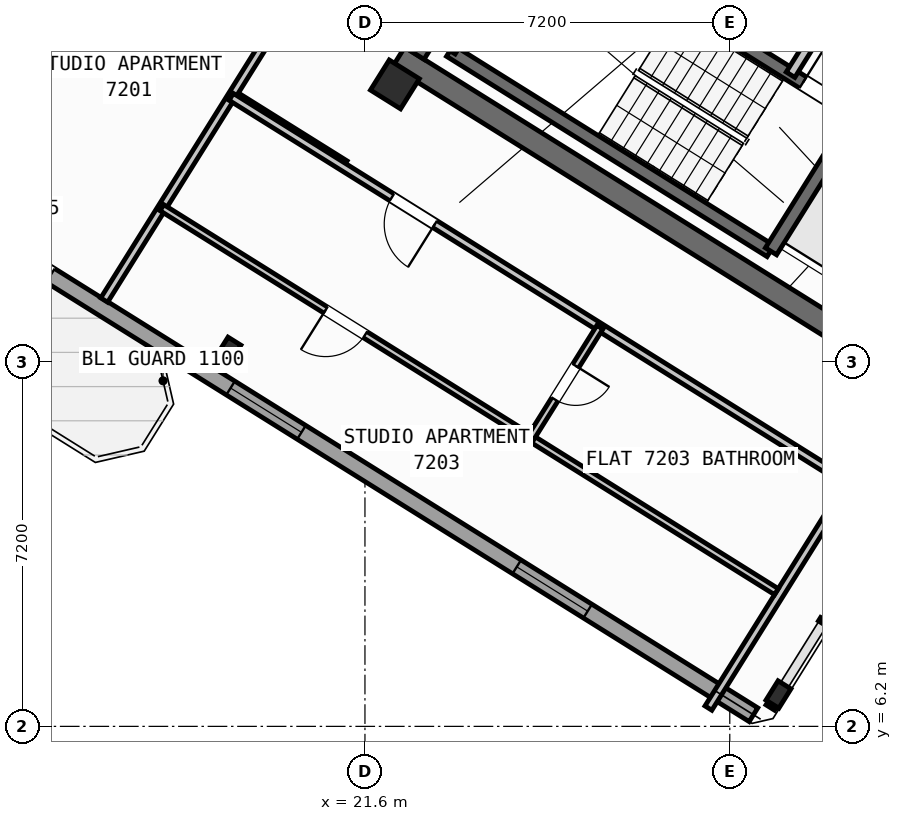
"""IFC4 building model, lengths in metres.
Left out: names, types, materials, properties, quantities, classifications, styles, units other than length and angle.
Written with IfcOpenShell. Run it as: python <this file> out.ifc"""

import sys

from ifc_helpers import new_model, si_unit, direction, frame, frame_2d, origin, origin_2d, place, context, subcontext, project, spatial, rectangle, hollow_rectangle, i_section, extrude, source, transform, mapped, element, fill, save


model = new_model("IFC4")
c1 = context("Model", 3, precision=1e-05, world=origin(), true_north=direction((0.0, 1.0)))
c2 = subcontext(c1, "Body", "Model", "MODEL_VIEW")
j1 = project(units=[si_unit("LENGTHUNIT", "METRE"), si_unit("PLANEANGLEUNIT", "RADIAN")], contexts=[c1])
p1 = place(None, origin())
s1 = spatial("IfcSite", under=j1, at=p1, CompositionType="ELEMENT")
p2 = place(p1, origin())
s2 = spatial("IfcBuilding", under=s1, at=p2, CompositionType="ELEMENT")
p3 = place(p2, frame((0.0, 0.0, 284.4)))
s3 = spatial("IfcBuildingStorey", under=s2, at=p3, CompositionType="ELEMENT", Elevation=284.4)
p4 = place(p3, frame((33.324, 12.503, 0.0), z_axis=(0.0, 0.0, 1.0), x_axis=(-0.848043529849, 0.529926571782, 0.0)))
e1 = element("IfcWall", 1, at=p4, inside=s3, PredefinedType="SHEAR", context=c2, shape_type="SweptSolid", body=[
    extrude(rectangle(XDim=13.04, YDim=0.45, at=frame_2d((6.52, 0.0))), origin(), (0.0, 0.0, 1.0), 3.35),
])
p5 = place(p3, frame((26.007, 24.976, 0.0), z_axis=(0.0, 0.0, 1.0), x_axis=(-0.529931155655, -0.848040665456, 0.0)))
e2 = element("IfcWall", 2, at=p5, inside=s3, PredefinedType="SHEAR", context=c2, shape_type="SweptSolid", body=[
    extrude(rectangle(XDim=6.475, YDim=0.45, at=frame_2d((3.238, 0.0))), origin(), (0.0, 0.0, 1.0), 3.35),
])
m1 = source(origin(), c2, "Body", "SweptSolid", [
    extrude(i_section(OverallWidth=0.3, OverallDepth=0.45, WebThickness=0.014, FlangeThickness=0.026, at=origin_2d()), origin(), (0.0, 0.0, 1.0), 3.6),
])
p6 = place(p3, frame((29.761, 6.829, 0.0), z_axis=(0.0, 0.0, 1.0), x_axis=(-0.848048096156, 0.529919264233, 0.0)))
e3 = element("IfcColumn", 3, at=p6, inside=s3, PredefinedType="COLUMN", context=c2, shape_type="MappedRepresentation", body=[
    mapped(m1, transform((0.0, 0.0, 0.0), scale=1.0)),
])
m2 = source(origin(), c2, "Body", "SweptSolid", [
    extrude(hollow_rectangle(XDim=0.7, YDim=0.7, WallThickness=0.028, at=origin_2d()), origin(), (0.0, 0.0, 1.0), 3.6),
])
p7 = place(p3, frame((22.191, 18.87, 0.0), z_axis=(0.0, 0.0, 1.0), x_axis=(-0.848048096156, 0.529919264233, 0.0)))
e4 = element("IfcColumn", 4, at=p7, inside=s3, PredefinedType="COLUMN", context=c2, shape_type="MappedRepresentation", body=[
    mapped(m2, transform((0.0, 0.0, 0.0), scale=1.0)),
])
p8 = place(p3, frame((18.906, 13.612, 0.0), z_axis=(0.0, 0.0, 1.0), x_axis=(-0.848048096156, 0.529919264233, 0.0)))
e5 = element("IfcColumn", 5, at=p8, inside=s3, PredefinedType="COLUMN", context=c2, shape_type="MappedRepresentation", body=[
    mapped(m1, transform((0.0, 0.0, 0.0), scale=1.0)),
])
p9 = place(p3, frame((29.268, 6.429, 0.0), z_axis=(0.0, 0.0, 1.0), x_axis=(-0.848048398186, 0.529918780885, 0.0)))
e6 = element("IfcWall", 6, at=p9, inside=s3, PredefinedType="STANDARD", context=c2, shape_type="SweptSolid", body=[
    extrude(rectangle(XDim=25.188, YDim=0.32, at=frame_2d((12.594, 0.0))), origin(), (0.0, 0.0, 1.0), 3.35),
])
p10 = place(p9, frame((16.362, 0.0, 0.0)))
e7 = element("IfcOpeningElement", 7, at=p10, cuts=e6, PredefinedType="OPENING", context=c2, shape_type="SweptSolid", body=[
    extrude(rectangle(XDim=1.2, YDim=2.15, at=frame_2d((0.6, 1.075))), frame((0.0, 0.17, 0.0), z_axis=(0.0, -1.0, 0.0), x_axis=(1.0, 0.0, 0.0)), (0.0, 0.0, 1.0), 0.34),
])
p11 = place(p9, frame((3.859, 0.0, 0.9)))
e8 = element("IfcOpeningElement", 8, at=p11, cuts=e6, PredefinedType="OPENING", context=c2, shape_type="SweptSolid", body=[
    extrude(rectangle(XDim=1.65, YDim=1.45, at=frame_2d((0.825, 0.725))), frame((0.0, 0.17, 0.0), z_axis=(0.0, -1.0, 0.0), x_axis=(1.0, 0.0, 0.0)), (0.0, 0.0, 1.0), 0.34),
])
p12 = place(p9, frame((10.519, 0.0, 0.9)))
e9 = element("IfcOpeningElement", 9, at=p12, cuts=e6, PredefinedType="OPENING", context=c2, shape_type="SweptSolid", body=[
    extrude(rectangle(XDim=1.65, YDim=1.45, at=frame_2d((0.825, 0.725))), frame((0.0, 0.17, 0.0), z_axis=(0.0, -1.0, 0.0), x_axis=(1.0, 0.0, 0.0)), (0.0, 0.0, 1.0), 0.34),
])
p13 = place(p9, frame((19.841, 0.0, 0.95)))
e10 = element("IfcOpeningElement", 10, at=p13, cuts=e6, PredefinedType="OPENING", context=c2, shape_type="SweptSolid", body=[
    extrude(rectangle(XDim=1.95, YDim=1.35, at=frame_2d((0.975, 0.675))), frame((0.0, 0.17, 0.0), z_axis=(0.0, -1.0, 0.0), x_axis=(1.0, 0.0, 0.0)), (0.0, 0.0, 1.0), 0.34),
])
p14 = place(p9, frame((23.478, 0.0, 1.0)))
e11 = element("IfcOpeningElement", 11, at=p14, cuts=e6, PredefinedType="OPENING", context=c2, shape_type="SweptSolid", body=[
    extrude(rectangle(XDim=0.9, YDim=1.25, at=frame_2d((0.45, 0.625))), frame((0.0, 0.17, 0.0), z_axis=(0.0, -1.0, 0.0), x_axis=(1.0, 0.0, 0.0)), (0.0, 0.0, 1.0), 0.34),
])
p15 = place(p3, frame((29.605, 15.581, 0.0), z_axis=(0.0, 0.0, 1.0), x_axis=(-0.848036911448, 0.529937163087, 0.0)))
e12 = element("IfcWall", 12, at=p15, inside=s3, PredefinedType="SHEAR", context=c2, shape_type="SweptSolid", body=[
    extrude(rectangle(XDim=7.46, YDim=0.26, at=frame_2d((3.73, 0.0))), origin(), (0.0, 0.0, 1.0), 3.35),
])
p16 = place(p3, frame((31.28, 18.261, 0.0), z_axis=(0.0, 0.0, 1.0), x_axis=(-0.848051618787, 0.529913626805, 0.0)))
e13 = element("IfcWall", 13, at=p16, inside=s3, PredefinedType="SHEAR", context=c2, shape_type="SweptSolid", body=[
    extrude(rectangle(XDim=7.46, YDim=0.26, at=frame_2d((3.73, 0.0))), origin(), (0.0, 0.0, 1.0), 3.35),
])
p17 = place(p16, frame((0.36, 0.0, 0.0)))
e14 = element("IfcOpeningElement", 14, at=p17, cuts=e13, PredefinedType="OPENING", context=c2, shape_type="SweptSolid", body=[
    extrude(rectangle(XDim=0.86, YDim=2.05, at=frame_2d((0.43, 1.025))), frame((0.0, 0.14, 0.0), z_axis=(0.0, -1.0, 0.0), x_axis=(1.0, 0.0, 0.0)), (0.0, 0.0, 1.0), 0.28),
])
p18 = place(p3, frame((31.288, 18.256, 0.0), z_axis=(0.0, 0.0, 1.0), x_axis=(-0.529943379326, -0.848033026897, 0.0)))
e15 = element("IfcWall", 15, at=p18, inside=s3, PredefinedType="SHEAR", context=c2, shape_type="SweptSolid", body=[
    extrude(rectangle(XDim=3.16, YDim=0.26, at=frame_2d((1.58, 0.0))), origin(), (0.0, 0.0, 1.0), 3.35),
])
p19 = place(p3, frame((24.945, 22.22, 0.0), z_axis=(0.0, 0.0, 1.0), x_axis=(-0.529908658664, -0.84805472316, 0.0)))
e16 = element("IfcWall", 16, at=p19, inside=s3, PredefinedType="SHEAR", context=c2, shape_type="SweptSolid", body=[
    extrude(rectangle(XDim=3.16, YDim=0.26, at=frame_2d((1.58, 0.0))), origin(), (0.0, 0.0, 1.0), 3.35),
])
p20 = place(p3, frame((31.525, 21.504, 0.0), z_axis=(0.0, 0.0, 1.0), x_axis=(-0.529907497854, -0.848055448493, 0.0)))
e17 = element("IfcWall", 17, at=p20, inside=s3, PredefinedType="STANDARD", context=c2, shape_type="SweptSolid", body=[
    extrude(rectangle(XDim=2.88, YDim=0.2, at=frame_2d((1.44, 0.0))), origin(), (0.0, 0.0, 1.0), 3.34),
])
p21 = place(p3, frame((21.206, 17.292, 0.0), z_axis=(0.0, 0.0, 1.0), x_axis=(-0.848050851465, 0.529914854792, 0.0)))
e18 = element("IfcWall", 18, at=p21, inside=s3, PredefinedType="PARTITIONING", context=c2, shape_type="SweptSolid", body=[
    extrude(rectangle(XDim=2.61, YDim=0.16, at=frame_2d((1.305, 0.0))), origin(), (0.0, 0.0, 1.0), 3.34),
])
p22 = place(p3, frame((25.807, 29.582, 0.0), z_axis=(0.0, 0.0, 1.0), x_axis=(-0.529918119251, -0.84804881162, 0.0)))
e19 = element("IfcWall", 19, at=p22, inside=s3, PredefinedType="PARTITIONING", context=c2, shape_type="SweptSolid", body=[
    extrude(rectangle(XDim=17.65, YDim=0.16, at=frame_2d((8.825, 0.0))), origin(), (0.0, 0.0, 1.0), 3.34),
])
p23 = place(p3, frame((16.572, 21.954, 0.0), z_axis=(0.0, 0.0, 1.0), x_axis=(-0.529904903214, -0.848057069748, 0.0)))
e20 = element("IfcWall", 20, at=p23, inside=s3, PredefinedType="PARTITIONING", context=c2, shape_type="SweptSolid", body=[
    extrude(rectangle(XDim=5.601, YDim=0.16, at=frame_2d((2.801, 0.0))), origin(), (0.0, 0.0, 1.0), 2.875),
])
p24 = place(p3, frame((19.523, 33.508, 0.0), z_axis=(0.0, 0.0, 1.0), x_axis=(-0.529910765222, -0.848053406869, 0.0)))
e21 = element("IfcWall", 21, at=p24, inside=s3, PredefinedType="PARTITIONING", context=c2, shape_type="SweptSolid", body=[
    extrude(rectangle(XDim=17.92, YDim=0.11, at=frame_2d((8.96, 0.0))), origin(), (0.0, 0.0, 1.0), 3.34),
])
p25 = place(p24, frame((0.76, 0.0, 0.0)))
e22 = element("IfcOpeningElement", 22, at=p25, cuts=e21, PredefinedType="OPENING", context=c2, shape_type="SweptSolid", body=[
    extrude(rectangle(XDim=0.78, YDim=2.05, at=frame_2d((0.39, 1.025))), frame((0.0, 0.065, 0.0), z_axis=(0.0, -1.0, 0.0), x_axis=(1.0, 0.0, 0.0)), (0.0, 0.0, 1.0), 0.13),
])
p26 = place(p24, frame((6.289, 0.0, 0.0)))
e23 = element("IfcOpeningElement", 23, at=p26, cuts=e21, PredefinedType="OPENING", context=c2, shape_type="SweptSolid", body=[
    extrude(rectangle(XDim=0.92, YDim=2.08, at=frame_2d((0.46, 1.04))), frame((0.0, 0.065, 0.0), z_axis=(0.0, -1.0, 0.0), x_axis=(1.0, 0.0, 0.0)), (0.0, 0.0, 1.0), 0.13),
])
p27 = place(p3, frame((32.164, 10.374, 0.0), z_axis=(0.0, 0.0, 1.0), x_axis=(-0.848044107957, 0.529925646633, 0.0)))
e24 = element("IfcWall", 24, at=p27, inside=s3, PredefinedType="PARTITIONING", context=c2, shape_type="SweptSolid", body=[
    extrude(rectangle(XDim=15.57, YDim=0.16, at=frame_2d((7.785, 0.0))), origin(), (0.0, 0.0, 1.0), 3.34),
])
p28 = place(p27, frame((10.83, 0.0, 0.0)))
e25 = element("IfcOpeningElement", 25, at=p28, cuts=e24, PredefinedType="OPENING", context=c2, shape_type="SweptSolid", body=[
    extrude(rectangle(XDim=1.0, YDim=2.1, at=frame_2d((0.5, 1.05))), frame((0.0, 0.09, 0.0), z_axis=(0.0, -1.0, 0.0), x_axis=(1.0, 0.0, 0.0)), (0.0, 0.0, 1.0), 0.18),
])
p29 = place(p3, frame((31.282, 11.208, 0.0), z_axis=(0.0, 0.0, 1.0), x_axis=(-0.529938869374, -0.84803584519, 0.0)))
e26 = element("IfcWall", 26, at=p29, inside=s3, PredefinedType="PARTITIONING", context=c2, shape_type="SweptSolid", body=[
    extrude(rectangle(XDim=5.48, YDim=0.16, at=frame_2d((2.74, 0.0))), origin(), (0.0, 0.0, 1.0), 3.34),
])
p30 = place(p3, frame((29.72, 8.859, 0.0), z_axis=(0.0, 0.0, 1.0), x_axis=(-0.848049134363, 0.529917602752, 0.0)))
e27 = element("IfcWall", 27, at=p30, inside=s3, PredefinedType="PLUMBINGWALL", context=c2, shape_type="SweptSolid", body=[
    extrude(rectangle(XDim=14.3, YDim=0.14, at=frame_2d((7.15, 0.0))), origin(), (0.0, 0.0, 1.0), 3.34),
])
p31 = place(p30, frame((9.57, 0.0, 0.0)))
e28 = element("IfcOpeningElement", 28, at=p31, cuts=e27, PredefinedType="OPENING", context=c2, shape_type="SweptSolid", body=[
    extrude(rectangle(XDim=0.92, YDim=2.08, at=frame_2d((0.46, 1.04))), frame((0.0, 0.08, 0.0), z_axis=(0.0, -1.0, 0.0), x_axis=(1.0, 0.0, 0.0)), (0.0, 0.0, 1.0), 0.16),
])
p32 = place(p3, frame((26.237, 14.078, 0.0), z_axis=(0.0, 0.0, 1.0), x_axis=(-0.52995640672, -0.848024885824, 0.0)))
e29 = element("IfcWall", 29, at=p32, inside=s3, PredefinedType="PLUMBINGWALL", context=c2, shape_type="SweptSolid", body=[
    extrude(rectangle(XDim=2.58, YDim=0.14, at=frame_2d((1.29, 0.0))), origin(), (0.0, 0.0, 1.0), 3.34),
])
p33 = place(p32, frame((0.9, 0.0, 0.0)))
e30 = element("IfcOpeningElement", 30, at=p33, cuts=e29, PredefinedType="OPENING", context=c2, shape_type="SweptSolid", body=[
    extrude(rectangle(XDim=0.78, YDim=2.05, at=frame_2d((0.39, 1.025))), frame((0.0, 0.08, 0.0), z_axis=(0.0, -1.0, 0.0), x_axis=(1.0, 0.0, 0.0)), (0.0, 0.0, 1.0), 0.16),
])
m3 = source(origin(), c2, "Body", "SweptSolid", [
    extrude(rectangle(XDim=1.65, YDim=1.45, at=frame_2d((0.825, 0.725))), frame((0.0, 0.03, 0.0), z_axis=(0.0, -1.0, 0.0), x_axis=(1.0, 0.0, 0.0)), (0.0, 0.0, 1.0), 0.06),
])
p34 = place(p11, origin())
e31 = element("IfcWindow", 31, at=p34, inside=s3, PartitioningType="SINGLE_PANEL", PredefinedType="WINDOW", context=c2, shape_type="MappedRepresentation", body=[
    mapped(m3, transform((0.0, 0.0, 0.0), scale=1.0)),
])
fill(e8, e31)
p35 = place(p12, origin())
e32 = element("IfcWindow", 32, at=p35, inside=s3, PartitioningType="SINGLE_PANEL", PredefinedType="WINDOW", context=c2, shape_type="MappedRepresentation", body=[
    mapped(m3, transform((0.0, 0.0, 0.0), scale=1.0)),
])
fill(e9, e32)
m4 = source(origin(), c2, "Body", "SweptSolid", [
    extrude(rectangle(XDim=0.86, YDim=2.05, at=frame_2d((0.43, 1.025))), frame((0.0, 0.025, 0.0), z_axis=(0.0, -1.0, 0.0), x_axis=(1.0, 0.0, 0.0)), (0.0, 0.0, 1.0), 0.05),
])
p36 = place(p17, frame((0.86, 0.0, 0.0), z_axis=(0.0, 0.0, 1.0), x_axis=(-1.0, 0.0, 0.0)))
e33 = element("IfcDoor", 33, at=p36, inside=s3, OperationType="SINGLE_SWING_LEFT", PredefinedType="DOOR", context=c2, shape_type="MappedRepresentation", body=[
    mapped(m4, transform((0.0, 0.0, 0.0), scale=1.0)),
])
fill(e14, e33)
m5 = source(origin(), c2, "Body", "SweptSolid", [
    extrude(rectangle(XDim=1.0, YDim=2.1, at=frame_2d((0.5, 1.05))), frame((0.0, 0.025, 0.0), z_axis=(0.0, -1.0, 0.0), x_axis=(1.0, 0.0, 0.0)), (0.0, 0.0, 1.0), 0.05),
])
p37 = place(p28, origin())
e34 = element("IfcDoor", 34, at=p37, inside=s3, OperationType="SINGLE_SWING_LEFT", PredefinedType="DOOR", context=c2, shape_type="MappedRepresentation", body=[
    mapped(m5, transform((0.0, 0.0, 0.0), scale=1.0)),
])
fill(e25, e34)
m6 = source(origin(), c2, "Body", "SweptSolid", [
    extrude(rectangle(XDim=0.92, YDim=2.08, at=frame_2d((0.46, 1.04))), frame((0.0, 0.025, 0.0), z_axis=(0.0, -1.0, 0.0), x_axis=(1.0, 0.0, 0.0)), (0.0, 0.0, 1.0), 0.05),
])
p38 = place(p31, origin())
e35 = element("IfcDoor", 35, at=p38, inside=s3, OperationType="SINGLE_SWING_RIGHT", PredefinedType="DOOR", context=c2, shape_type="MappedRepresentation", body=[
    mapped(m6, transform((0.0, 0.0, 0.0), scale=1.0)),
])
fill(e28, e35)
m7 = source(origin(), c2, "Body", "SweptSolid", [
    extrude(rectangle(XDim=0.78, YDim=2.05, at=frame_2d((0.39, 1.025))), frame((0.0, 0.025, 0.0), z_axis=(0.0, -1.0, 0.0), x_axis=(1.0, 0.0, 0.0)), (0.0, 0.0, 1.0), 0.05),
])
p39 = place(p33, origin())
e36 = element("IfcDoor", 36, at=p39, inside=s3, OperationType="SINGLE_SWING_LEFT", PredefinedType="DOOR", context=c2, shape_type="MappedRepresentation", body=[
    mapped(m7, transform((0.0, 0.0, 0.0), scale=1.0)),
])
fill(e30, e36)
save(model, sys.argv[1])
